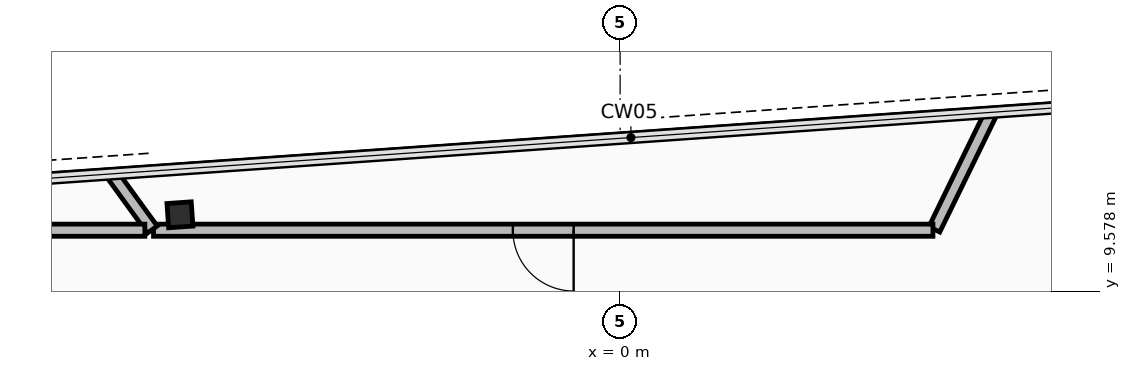
"""IFC4 building model, lengths in metres.
Left out: names, types, materials, properties, quantities, classifications, styles, units other than length and angle.
Written with IfcOpenShell. Run it as: python <this file> out.ifc"""

import sys

from ifc_helpers import new_model, si_unit, direction, frame, frame_2d, origin, origin_2d, place, context, subcontext, project, spatial, rectangle, hollow_rectangle, extrude, element, fill, save


model = new_model("IFC4")
c1 = context("Model", 3, precision=1e-05, world=origin(), true_north=direction((0.0, 1.0)))
c2 = subcontext(c1, "Body", "Model", "MODEL_VIEW")
j1 = project(units=[si_unit("LENGTHUNIT", "METRE"), si_unit("PLANEANGLEUNIT", "RADIAN")], contexts=[c1])
p1 = place(None, origin())
s1 = spatial("IfcSite", under=j1, at=p1, CompositionType="ELEMENT")
p2 = place(p1, origin())
s2 = spatial("IfcBuilding", under=s1, at=p2, CompositionType="ELEMENT")
p3 = place(p2, frame((0.0, 0.0, 257.0)))
s3 = spatial("IfcBuildingStorey", under=s2, at=p3, CompositionType="ELEMENT", Elevation=257.0)
p4 = place(p3, frame((-7.24, 10.833, 0.0), z_axis=(0.0, 0.0, 1.0), x_axis=(0.99756392851, 0.069758214822, 0.0)))
e1 = element("IfcColumn", 1, at=p4, inside=s3, PredefinedType="COLUMN", context=c2, shape_type="SweptSolid", body=[
    extrude(hollow_rectangle(XDim=0.4, YDim=0.4, WallThickness=0.025, at=origin_2d()), origin(), (0.0, 0.0, 1.0), 3.6),
])
p5 = place(p3, frame((6.105, 12.518, 0.0), z_axis=(0.0, 0.0, 1.0), x_axis=(-0.438387681023, -0.898785981826, 0.0)))
e2 = element("IfcWall", 2, at=p5, inside=s3, PredefinedType="PARTITIONING", context=c2, shape_type="SweptSolid", body=[
    extrude(rectangle(XDim=2.141, YDim=0.2, at=frame_2d((1.07, 0.0))), origin(), (0.0, 0.0, 1.0), 2.765),
])
p6 = place(p3, frame((5.145, 10.58, 0.0), z_axis=(0.0, 0.0, 1.0), x_axis=(-1.0, 0.0, 0.0)))
e3 = element("IfcWall", 3, at=p6, inside=s3, PredefinedType="PARTITIONING", context=c2, shape_type="SweptSolid", body=[
    extrude(rectangle(XDim=12.819, YDim=0.2, at=frame_2d((6.409, 0.0))), origin(), (0.0, 0.0, 1.0), 2.765),
])
p7 = place(p6, frame((5.909, 0.0, 0.0)))
e4 = element("IfcOpeningElement", 4, at=p7, cuts=e3, PredefinedType="OPENING", context=c2, shape_type="SweptSolid", body=[
    extrude(rectangle(XDim=1.0, YDim=2.15, at=frame_2d((0.5, 1.075))), frame((0.0, 0.11, 0.0), z_axis=(0.0, -1.0, 0.0), x_axis=(1.0, 0.0, 0.0)), (0.0, 0.0, 1.0), 0.22),
])
p8 = place(p3, frame((-7.694, 10.59, 0.0), z_axis=(0.0, 0.0, 1.0), x_axis=(-0.587825586486, 0.808987688332, 0.0)))
e5 = element("IfcWall", 5, at=p8, inside=s3, PredefinedType="PARTITIONING", context=c2, shape_type="SweptSolid", body=[
    extrude(rectangle(XDim=1.133, YDim=0.2, at=frame_2d((0.566, 0.0))), origin(), (0.0, 0.0, 1.0), 2.765),
])
p9 = place(p3, frame((-7.817, 10.58, 0.0), z_axis=(0.0, 0.0, 1.0), x_axis=(-1.0, 0.0, 0.0)))
e6 = element("IfcWall", 6, at=p9, inside=s3, PredefinedType="PARTITIONING", context=c2, shape_type="SweptSolid", body=[
    extrude(rectangle(XDim=4.063, YDim=0.2, at=frame_2d((2.031, 0.0))), origin(), (0.0, 0.0, 1.0), 2.765),
])
p10 = place(p7, origin())
e7 = element("IfcDoor", 7, at=p10, inside=s3, OperationType="SINGLE_SWING_RIGHT", PredefinedType="DOOR", context=c2, shape_type="SweptSolid", body=[
    extrude(rectangle(XDim=1.0, YDim=2.15, at=frame_2d((0.5, 1.075))), frame((0.0, 0.025, 0.0), z_axis=(0.0, -1.0, 0.0), x_axis=(1.0, 0.0, 0.0)), (0.0, 0.0, 1.0), 0.05),
])
fill(e4, e7)
save(model, sys.argv[1])
